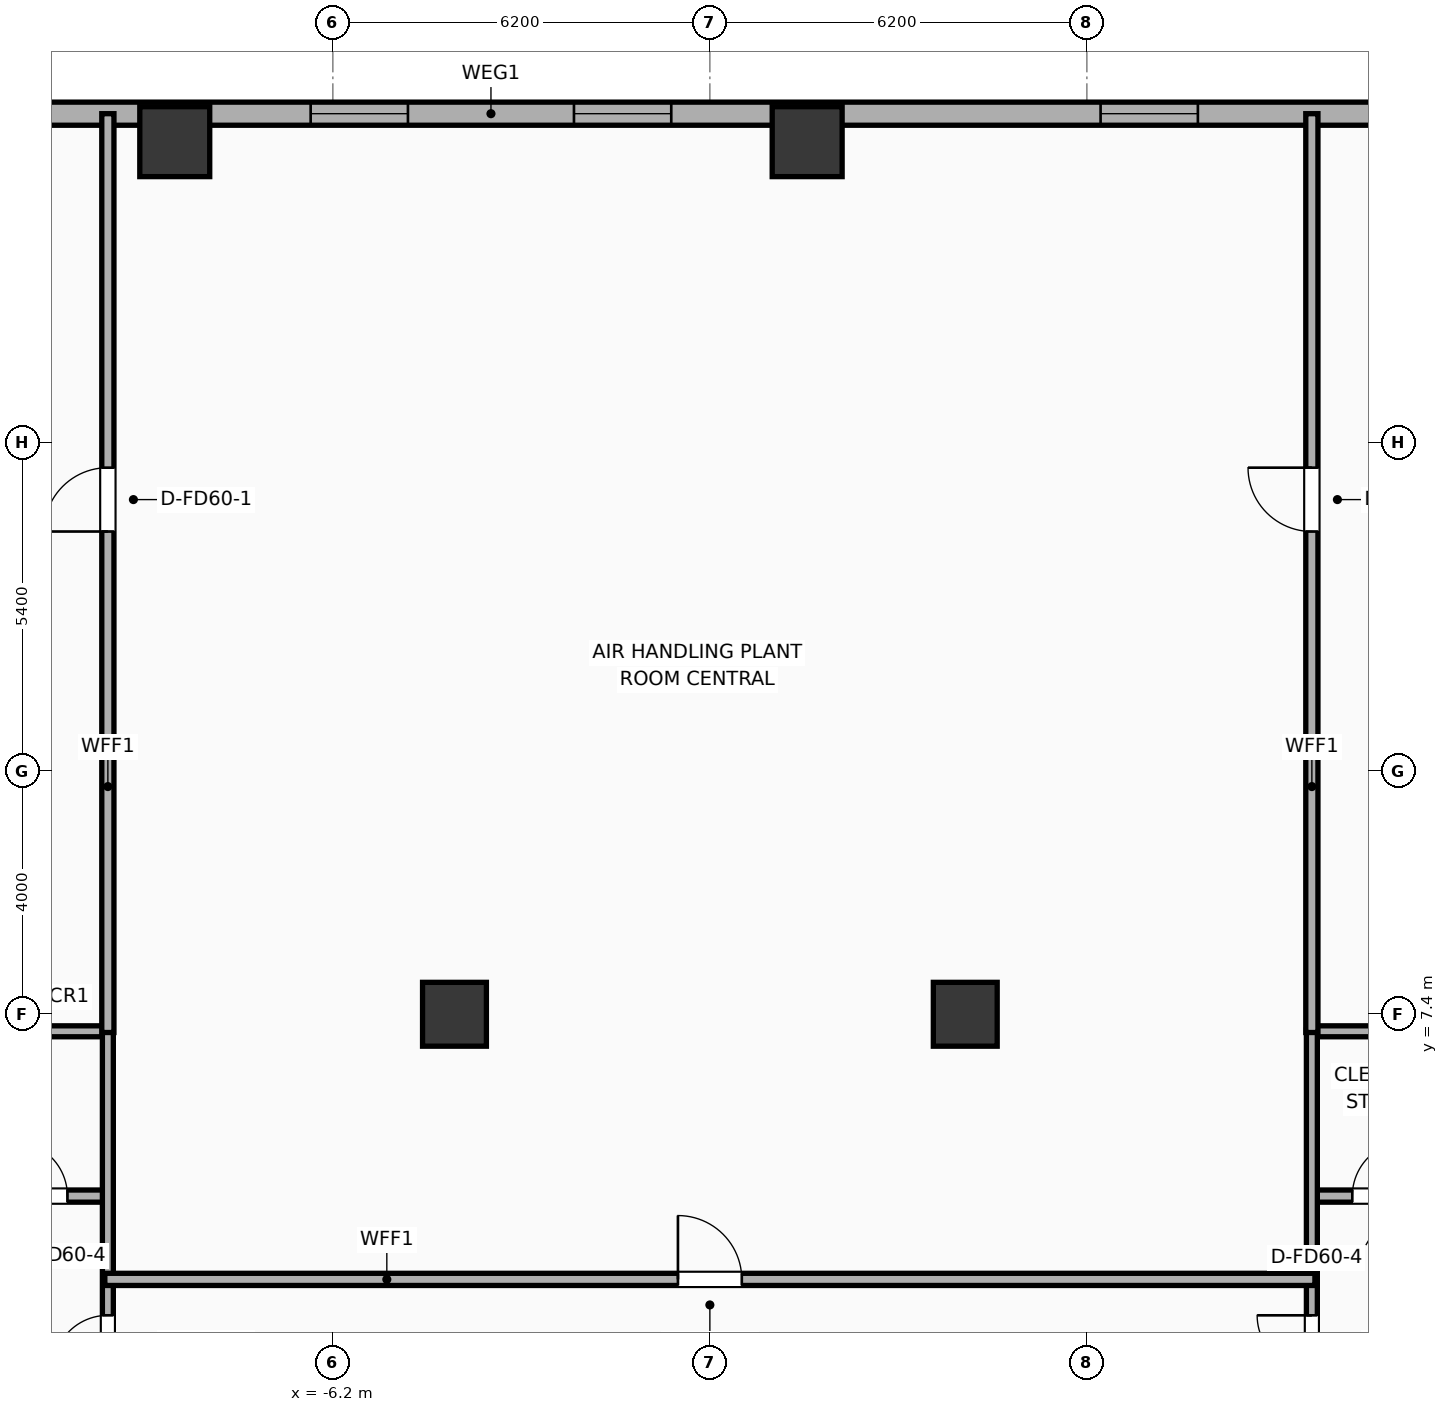
"""IFC4 building model, lengths in metres.
Left out: names, types, materials, properties, quantities, classifications, styles, units other than length and angle.
Written with IfcOpenShell. Run it as: python <this file> out.ifc"""

import sys

from ifc_helpers import new_model, si_unit, direction, frame, frame_2d, origin, origin_2d, place, context, subcontext, project, spatial, rectangle, hollow_rectangle, extrude, element, fill, save


model = new_model("IFC4")
c1 = context("Model", 3, precision=1e-05, world=origin(), true_north=direction((0.0, 1.0)))
c2 = subcontext(c1, "Body", "Model", "MODEL_VIEW")
j1 = project(units=[si_unit("LENGTHUNIT", "METRE"), si_unit("PLANEANGLEUNIT", "RADIAN")], contexts=[c1])
p1 = place(None, origin())
s1 = spatial("IfcSite", under=j1, at=p1, CompositionType="ELEMENT")
p2 = place(p1, origin())
s2 = spatial("IfcBuilding", under=s1, at=p2, CompositionType="ELEMENT")
p3 = place(p2, frame((0.0, 0.0, 80.6)))
s3 = spatial("IfcBuildingStorey", under=s2, at=p3, CompositionType="ELEMENT", Elevation=80.6)
for number, where, z_axis, x_axis in (
    (1, (-4.2, 7.4, 0.0), (0.0, 0.0, 1.0), (1.0, 0.0, 0.0)),
    (2, (4.2, 7.4, 0.0), (0.0, 0.0, 1.0), (1.0, 0.0, 0.0)),
):
    element("IfcColumn", number, at=place(p3, frame(where, z_axis=z_axis, x_axis=x_axis)), inside=s3, PredefinedType="COLUMN", context=c2, shape_type="SweptSolid", body=[
        extrude(rectangle(XDim=1.05, YDim=1.05, at=origin_2d()), origin(), (0.0, 0.0, 1.0), 5.2),
    ])
for number, where, z_axis, x_axis in (
    (3, (1.6, 21.75, 0.0), (0.0, 0.0, 1.0), (1.0, 0.0, 0.0)),
    (4, (-8.8, 21.75, 0.0), (0.0, 0.0, 1.0), (1.0, 0.0, 0.0)),
):
    element("IfcColumn", number, at=place(p3, frame(where, z_axis=z_axis, x_axis=x_axis)), inside=s3, PredefinedType="COLUMN", context=c2, shape_type="SweptSolid", body=[
        extrude(hollow_rectangle(XDim=1.15, YDim=1.15, WallThickness=0.04, at=origin_2d()), origin(), (0.0, 0.0, 1.0), 5.165),
    ])
p4 = place(p3, frame((-29.581, 22.21, 0.0), z_axis=(0.0, 0.0, 1.0), x_axis=(1.0, 0.0, 0.0)))
e5 = element("IfcWall", 5, at=p4, inside=s3, PredefinedType="ELEMENTEDWALL", context=c2, shape_type="SweptSolid", body=[
    extrude(rectangle(XDim=51.963, YDim=0.38, at=frame_2d((25.981, 0.0))), origin(), (0.0, 0.0, 1.0), 3.69),
])
p5 = place(p4, frame((1.365, 0.0, 0.75)))
e6 = element("IfcOpeningElement", 6, at=p5, cuts=e5, PredefinedType="OPENING", context=c2, shape_type="SweptSolid", body=[
    extrude(rectangle(XDim=1.6, YDim=1.4, at=frame_2d((0.8, 0.7))), frame((0.0, 0.2, 0.0), z_axis=(0.0, -1.0, 0.0), x_axis=(1.0, 0.0, 0.0)), (0.0, 0.0, 1.0), 0.4),
])
p6 = place(p4, frame((5.695, 0.0, 0.75)))
e7 = element("IfcOpeningElement", 7, at=p6, cuts=e5, PredefinedType="OPENING", context=c2, shape_type="SweptSolid", body=[
    extrude(rectangle(XDim=1.6, YDim=1.4, at=frame_2d((0.8, 0.7))), frame((0.0, 0.2, 0.0), z_axis=(0.0, -1.0, 0.0), x_axis=(1.0, 0.0, 0.0)), (0.0, 0.0, 1.0), 0.4),
])
p7 = place(p4, frame((14.356, 0.0, 0.75)))
e8 = element("IfcOpeningElement", 8, at=p7, cuts=e5, PredefinedType="OPENING", context=c2, shape_type="SweptSolid", body=[
    extrude(rectangle(XDim=1.6, YDim=1.4, at=frame_2d((0.8, 0.7))), frame((0.0, 0.2, 0.0), z_axis=(0.0, -1.0, 0.0), x_axis=(1.0, 0.0, 0.0)), (0.0, 0.0, 1.0), 0.4),
])
p8 = place(p4, frame((23.016, 0.0, 0.75)))
e9 = element("IfcOpeningElement", 9, at=p8, cuts=e5, PredefinedType="OPENING", context=c2, shape_type="SweptSolid", body=[
    extrude(rectangle(XDim=1.6, YDim=1.4, at=frame_2d((0.8, 0.7))), frame((0.0, 0.2, 0.0), z_axis=(0.0, -1.0, 0.0), x_axis=(1.0, 0.0, 0.0)), (0.0, 0.0, 1.0), 0.4),
])
p9 = place(p4, frame((27.346, 0.0, 0.75)))
e10 = element("IfcOpeningElement", 10, at=p9, cuts=e5, PredefinedType="OPENING", context=c2, shape_type="SweptSolid", body=[
    extrude(rectangle(XDim=1.6, YDim=1.4, at=frame_2d((0.8, 0.7))), frame((0.0, 0.2, 0.0), z_axis=(0.0, -1.0, 0.0), x_axis=(1.0, 0.0, 0.0)), (0.0, 0.0, 1.0), 0.4),
])
p10 = place(p4, frame((36.007, 0.0, 0.75)))
e11 = element("IfcOpeningElement", 11, at=p10, cuts=e5, PredefinedType="OPENING", context=c2, shape_type="SweptSolid", body=[
    extrude(rectangle(XDim=1.6, YDim=1.4, at=frame_2d((0.8, 0.7))), frame((0.0, 0.2, 0.0), z_axis=(0.0, -1.0, 0.0), x_axis=(1.0, 0.0, 0.0)), (0.0, 0.0, 1.0), 0.4),
])
p11 = place(p4, frame((44.667, 0.0, 0.75)))
e12 = element("IfcOpeningElement", 12, at=p11, cuts=e5, PredefinedType="OPENING", context=c2, shape_type="SweptSolid", body=[
    extrude(rectangle(XDim=1.6, YDim=1.4, at=frame_2d((0.8, 0.7))), frame((0.0, 0.2, 0.0), z_axis=(0.0, -1.0, 0.0), x_axis=(1.0, 0.0, 0.0)), (0.0, 0.0, 1.0), 0.4),
])
p12 = place(p4, frame((48.998, 0.0, 0.75)))
e13 = element("IfcOpeningElement", 13, at=p12, cuts=e5, PredefinedType="OPENING", context=c2, shape_type="SweptSolid", body=[
    extrude(rectangle(XDim=1.6, YDim=1.4, at=frame_2d((0.8, 0.7))), frame((0.0, 0.2, 0.0), z_axis=(0.0, -1.0, 0.0), x_axis=(1.0, 0.0, 0.0)), (0.0, 0.0, 1.0), 0.4),
])
p13 = place(p3, frame((-12.15, 4.41, 0.0), z_axis=(0.0, 0.0, 1.0), x_axis=(1.0, 0.0, 0.0)))
e14 = element("IfcWall", 14, at=p13, inside=s3, PredefinedType="PARTITIONING", context=c2, shape_type="SweptSolid", body=[
    extrude(rectangle(XDim=2.27, YDim=0.2, at=frame_2d((1.135, 0.0))), origin(), (0.0, 0.0, 1.0), 4.8),
])
p14 = place(p13, frame((0.685, 0.0, 0.0)))
e15 = element("IfcOpeningElement", 15, at=p14, cuts=e14, PredefinedType="OPENING", context=c2, shape_type="SweptSolid", body=[
    extrude(rectangle(XDim=0.9, YDim=2.05, at=frame_2d((0.45, 1.025))), frame((0.0, 0.11, 0.0), z_axis=(0.0, -1.0, 0.0), x_axis=(1.0, 0.0, 0.0)), (0.0, 0.0, 1.0), 0.22),
])
p15 = place(p3, frame((-12.15, 7.12, 0.0), z_axis=(0.0, 0.0, 1.0), x_axis=(1.0, 0.0, 0.0)))
e16 = element("IfcWall", 16, at=p15, inside=s3, PredefinedType="PARTITIONING", context=c2, shape_type="SweptSolid", body=[
    extrude(rectangle(XDim=2.27, YDim=0.18, at=frame_2d((1.135, 0.0))), origin(), (0.0, 0.0, 1.0), 3.84),
])
p16 = place(p3, frame((9.88, 4.41, 0.0), z_axis=(0.0, 0.0, 1.0), x_axis=(1.0, 0.0, 0.0)))
e17 = element("IfcWall", 17, at=p16, inside=s3, PredefinedType="PARTITIONING", context=c2, shape_type="SweptSolid", body=[
    extrude(rectangle(XDim=2.27, YDim=0.2, at=frame_2d((1.135, 0.0))), origin(), (0.0, 0.0, 1.0), 4.8),
])
p17 = place(p16, frame((0.685, 0.0, 0.0)))
e18 = element("IfcOpeningElement", 18, at=p17, cuts=e17, PredefinedType="OPENING", context=c2, shape_type="SweptSolid", body=[
    extrude(rectangle(XDim=0.9, YDim=2.05, at=frame_2d((0.45, 1.025))), frame((0.0, 0.11, 0.0), z_axis=(0.0, -1.0, 0.0), x_axis=(1.0, 0.0, 0.0)), (0.0, 0.0, 1.0), 0.22),
])
p18 = place(p3, frame((9.88, 7.12, 0.0), z_axis=(0.0, 0.0, 1.0), x_axis=(1.0, 0.0, 0.0)))
e19 = element("IfcWall", 19, at=p18, inside=s3, PredefinedType="PARTITIONING", context=c2, shape_type="SweptSolid", body=[
    extrude(rectangle(XDim=2.27, YDim=0.18, at=frame_2d((1.135, 0.0))), origin(), (0.0, 0.0, 1.0), 3.84),
])
p19 = place(p3, frame((-9.9, -7.14, 0.0), z_axis=(0.0, 0.0, 1.0), x_axis=(0.0, 1.0, 0.0)))
e20 = element("IfcWall", 20, at=p19, inside=s3, PredefinedType="PARTITIONING", context=c2, shape_type="SweptSolid", body=[
    extrude(rectangle(XDim=14.28, YDim=0.18, at=frame_2d((7.14, 0.0))), origin(), (0.0, 0.0, 1.0), 4.8),
])
p20 = place(p19, frame((8.689, 0.0, 0.0)))
e21 = element("IfcOpeningElement", 21, at=p20, cuts=e20, PredefinedType="OPENING", context=c2, shape_type="SweptSolid", body=[
    extrude(rectangle(XDim=0.9, YDim=2.05, at=frame_2d((0.45, 1.025))), frame((0.0, 0.1, 0.0), z_axis=(0.0, -1.0, 0.0), x_axis=(1.0, 0.0, 0.0)), (0.0, 0.0, 1.0), 0.2),
])
p21 = place(p3, frame((9.9, -7.14, 0.0), z_axis=(0.0, 0.0, 1.0), x_axis=(0.0, 1.0, 0.0)))
e22 = element("IfcWall", 22, at=p21, inside=s3, PredefinedType="PARTITIONING", context=c2, shape_type="SweptSolid", body=[
    extrude(rectangle(XDim=14.28, YDim=0.18, at=frame_2d((7.14, 0.0))), origin(), (0.0, 0.0, 1.0), 4.8),
])
p22 = place(p21, frame((8.689, 0.0, 0.0)))
e23 = element("IfcOpeningElement", 23, at=p22, cuts=e22, PredefinedType="OPENING", context=c2, shape_type="SweptSolid", body=[
    extrude(rectangle(XDim=0.9, YDim=2.05, at=frame_2d((0.45, 1.025))), frame((0.0, 0.1, 0.0), z_axis=(0.0, -1.0, 0.0), x_axis=(1.0, 0.0, 0.0)), (0.0, 0.0, 1.0), 0.2),
])
p23 = place(p3, frame((-9.95, 3.04, 0.0), z_axis=(0.0, 0.0, 1.0), x_axis=(1.0, 0.0, 0.0)))
e24 = element("IfcWall", 24, at=p23, inside=s3, PredefinedType="PARTITIONING", context=c2, shape_type="SweptSolid", body=[
    extrude(rectangle(XDim=19.9, YDim=0.2, at=frame_2d((9.95, 0.0))), origin(), (0.0, 0.0, 1.0), 4.8),
])
p24 = place(p23, frame((9.425, 0.0, 0.0)))
e25 = element("IfcOpeningElement", 25, at=p24, cuts=e24, PredefinedType="OPENING", context=c2, shape_type="SweptSolid", body=[
    extrude(rectangle(XDim=1.05, YDim=2.05, at=frame_2d((0.525, 1.025))), frame((0.0, 0.11, 0.0), z_axis=(0.0, -1.0, 0.0), x_axis=(1.0, 0.0, 0.0)), (0.0, 0.0, 1.0), 0.22),
])
p25 = place(p3, frame((-9.9, 7.1, 0.0), z_axis=(0.0, 0.0, 1.0), x_axis=(0.0, 1.0, 0.0)))
e26 = element("IfcWall", 26, at=p25, inside=s3, PredefinedType="PARTITIONING", context=c2, shape_type="SweptSolid", body=[
    extrude(rectangle(XDim=15.11, YDim=0.2, at=frame_2d((7.555, 0.0))), origin(), (0.0, 0.0, 1.0), 4.8),
])
p26 = place(p25, frame((8.239, 0.0, 0.0)))
e27 = element("IfcOpeningElement", 27, at=p26, cuts=e26, PredefinedType="OPENING", context=c2, shape_type="SweptSolid", body=[
    extrude(rectangle(XDim=1.05, YDim=2.05, at=frame_2d((0.525, 1.025))), frame((0.0, 0.11, 0.0), z_axis=(0.0, -1.0, 0.0), x_axis=(1.0, 0.0, 0.0)), (0.0, 0.0, 1.0), 0.22),
])
p27 = place(p3, frame((9.9, 7.1, 0.0), z_axis=(0.0, 0.0, 1.0), x_axis=(0.0, 1.0, 0.0)))
e28 = element("IfcWall", 28, at=p27, inside=s3, PredefinedType="PARTITIONING", context=c2, shape_type="SweptSolid", body=[
    extrude(rectangle(XDim=15.11, YDim=0.2, at=frame_2d((7.555, 0.0))), origin(), (0.0, 0.0, 1.0), 4.8),
])
p28 = place(p27, frame((8.239, 0.0, 0.0)))
e29 = element("IfcOpeningElement", 29, at=p28, cuts=e28, PredefinedType="OPENING", context=c2, shape_type="SweptSolid", body=[
    extrude(rectangle(XDim=1.05, YDim=2.05, at=frame_2d((0.525, 1.025))), frame((0.0, 0.11, 0.0), z_axis=(0.0, -1.0, 0.0), x_axis=(1.0, 0.0, 0.0)), (0.0, 0.0, 1.0), 0.22),
])
p29 = place(p8, origin())
e30 = element("IfcWindow", 30, at=p29, inside=s3, PartitioningType="SINGLE_PANEL", PredefinedType="WINDOW", context=c2, shape_type="SweptSolid", body=[
    extrude(rectangle(XDim=1.6, YDim=1.4, at=frame_2d((0.8, 0.7))), frame((0.0, 0.03, 0.0), z_axis=(0.0, -1.0, 0.0), x_axis=(1.0, 0.0, 0.0)), (0.0, 0.0, 1.0), 0.06),
])
fill(e9, e30)
p30 = place(p9, origin())
e31 = element("IfcWindow", 31, at=p30, inside=s3, PartitioningType="SINGLE_PANEL", PredefinedType="WINDOW", context=c2, shape_type="SweptSolid", body=[
    extrude(rectangle(XDim=1.6, YDim=1.4, at=frame_2d((0.8, 0.7))), frame((0.0, 0.03, 0.0), z_axis=(0.0, -1.0, 0.0), x_axis=(1.0, 0.0, 0.0)), (0.0, 0.0, 1.0), 0.06),
])
fill(e10, e31)
p31 = place(p10, origin())
e32 = element("IfcWindow", 32, at=p31, inside=s3, PartitioningType="SINGLE_PANEL", PredefinedType="WINDOW", context=c2, shape_type="SweptSolid", body=[
    extrude(rectangle(XDim=1.6, YDim=1.4, at=frame_2d((0.8, 0.7))), frame((0.0, 0.03, 0.0), z_axis=(0.0, -1.0, 0.0), x_axis=(1.0, 0.0, 0.0)), (0.0, 0.0, 1.0), 0.06),
])
fill(e11, e32)
p32 = place(p14, origin())
e33 = element("IfcDoor", 33, at=p32, inside=s3, OperationType="SINGLE_SWING_LEFT", PredefinedType="DOOR", context=c2, shape_type="SweptSolid", body=[
    extrude(rectangle(XDim=0.9, YDim=2.05, at=frame_2d((0.45, 1.025))), frame((0.0, 0.025, 0.0), z_axis=(0.0, -1.0, 0.0), x_axis=(1.0, 0.0, 0.0)), (0.0, 0.0, 1.0), 0.05),
])
fill(e15, e33)
p33 = place(p17, origin())
e34 = element("IfcDoor", 34, at=p33, inside=s3, OperationType="SINGLE_SWING_RIGHT", PredefinedType="DOOR", context=c2, shape_type="SweptSolid", body=[
    extrude(rectangle(XDim=0.9, YDim=2.05, at=frame_2d((0.45, 1.025))), frame((0.0, 0.025, 0.0), z_axis=(0.0, -1.0, 0.0), x_axis=(1.0, 0.0, 0.0)), (0.0, 0.0, 1.0), 0.05),
])
fill(e18, e34)
p34 = place(p20, origin())
e35 = element("IfcDoor", 35, at=p34, inside=s3, OperationType="SINGLE_SWING_LEFT", PredefinedType="DOOR", context=c2, shape_type="SweptSolid", body=[
    extrude(rectangle(XDim=0.9, YDim=2.05, at=frame_2d((0.45, 1.025))), frame((0.0, 0.025, 0.0), z_axis=(0.0, -1.0, 0.0), x_axis=(1.0, 0.0, 0.0)), (0.0, 0.0, 1.0), 0.05),
])
fill(e21, e35)
p35 = place(p22, origin())
e36 = element("IfcDoor", 36, at=p35, inside=s3, OperationType="SINGLE_SWING_RIGHT", PredefinedType="DOOR", context=c2, shape_type="SweptSolid", body=[
    extrude(rectangle(XDim=0.9, YDim=2.05, at=frame_2d((0.45, 1.025))), frame((0.0, 0.025, 0.0), z_axis=(0.0, -1.0, 0.0), x_axis=(1.0, 0.0, 0.0)), (0.0, 0.0, 1.0), 0.05),
])
fill(e23, e36)
p36 = place(p24, origin())
e37 = element("IfcDoor", 37, at=p36, inside=s3, OperationType="SINGLE_SWING_LEFT", PredefinedType="DOOR", context=c2, shape_type="SweptSolid", body=[
    extrude(rectangle(XDim=1.05, YDim=2.05, at=frame_2d((0.525, 1.025))), frame((0.0, 0.025, 0.0), z_axis=(0.0, -1.0, 0.0), x_axis=(1.0, 0.0, 0.0)), (0.0, 0.0, 1.0), 0.05),
])
fill(e25, e37)
p37 = place(p26, origin())
e38 = element("IfcDoor", 38, at=p37, inside=s3, OperationType="SINGLE_SWING_LEFT", PredefinedType="DOOR", context=c2, shape_type="SweptSolid", body=[
    extrude(rectangle(XDim=1.05, YDim=2.05, at=frame_2d((0.525, 1.025))), frame((0.0, 0.025, 0.0), z_axis=(0.0, -1.0, 0.0), x_axis=(1.0, 0.0, 0.0)), (0.0, 0.0, 1.0), 0.05),
])
fill(e27, e38)
p38 = place(p28, origin())
e39 = element("IfcDoor", 39, at=p38, inside=s3, OperationType="SINGLE_SWING_RIGHT", PredefinedType="DOOR", context=c2, shape_type="SweptSolid", body=[
    extrude(rectangle(XDim=1.05, YDim=2.05, at=frame_2d((0.525, 1.025))), frame((0.0, 0.025, 0.0), z_axis=(0.0, -1.0, 0.0), x_axis=(1.0, 0.0, 0.0)), (0.0, 0.0, 1.0), 0.05),
])
fill(e29, e39)
save(model, sys.argv[1])
